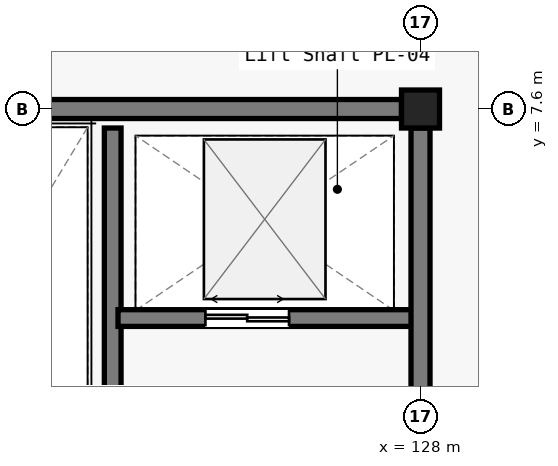
"""IFC4 building model, lengths in metres.
Left out: names, types, materials, properties, quantities, classifications, styles, units other than length and angle.
Written with IfcOpenShell. Run it as: python <this file> out.ifc"""

import sys

from ifc_helpers import new_model, si_unit, direction, frame, frame_2d, origin, origin_2d, place, context, subcontext, project, spatial, rectangle, extrude, element, fill, save


model = new_model("IFC4")
c1 = context("Model", 3, precision=1e-05, world=origin(), true_north=direction((0.0, 1.0)))
c2 = subcontext(c1, "Body", "Model", "MODEL_VIEW")
j1 = project(units=[si_unit("LENGTHUNIT", "METRE"), si_unit("PLANEANGLEUNIT", "RADIAN")], contexts=[c1])
p1 = place(None, origin())
s1 = spatial("IfcSite", under=j1, at=p1, CompositionType="ELEMENT")
p2 = place(p1, origin())
s2 = spatial("IfcBuilding", under=s1, at=p2, CompositionType="ELEMENT")
p3 = place(p2, frame((0.0, 0.0, 15.0)))
s3 = spatial("IfcBuildingStorey", under=s2, at=p3, CompositionType="ELEMENT", Elevation=15.0)
p4 = place(p3, frame((128.0, 7.6, 0.0), z_axis=(0.0, 0.0, 1.0), x_axis=(1.0, 0.0, 0.0)))
e1 = element("IfcColumn", 1, at=p4, inside=s3, PredefinedType="COLUMN", context=c2, shape_type="SweptSolid", body=[
    extrude(rectangle(XDim=0.5, YDim=0.5, at=origin_2d()), origin(), (0.0, 0.0, 1.0), 4.8),
])
p5 = place(p3, frame((120.3, 7.6, 0.0), z_axis=(0.0, 0.0, 1.0), x_axis=(1.0, 0.0, 0.0)))
e2 = element("IfcWall", 2, at=p5, inside=s3, PredefinedType="SOLIDWALL", context=c2, shape_type="SweptSolid", body=[
    extrude(rectangle(XDim=7.45, YDim=0.25, at=frame_2d((3.725, 0.0))), origin(), (0.0, 0.0, 1.0), 3.9),
])
p6 = place(p3, frame((123.95, 0.25, 0.0), z_axis=(0.0, 0.0, 1.0), x_axis=(0.0, 1.0, 0.0)))
e3 = element("IfcWall", 3, at=p6, inside=s3, PredefinedType="SOLIDWALL", context=c2, shape_type="SweptSolid", body=[
    extrude(rectangle(XDim=7.1, YDim=0.22, at=frame_2d((3.55, 0.0))), origin(), (0.0, 0.0, 1.0), 4.53),
])
p7 = place(p6, frame((0.35, 0.0, 0.0)))
e4 = element("IfcOpeningElement", 4, at=p7, cuts=e3, PredefinedType="OPENING", context=c2, shape_type="SweptSolid", body=[
    extrude(rectangle(XDim=1.2, YDim=2.15, at=frame_2d((0.6, 1.075))), frame((0.0, 0.12, 0.0), z_axis=(0.0, -1.0, 0.0), x_axis=(1.0, 0.0, 0.0)), (0.0, 0.0, 1.0), 0.24),
])
p8 = place(p3, frame((124.02, 4.85, 0.0), z_axis=(0.0, 0.0, 1.0), x_axis=(1.0, 0.0, 0.0)))
e5 = element("IfcWall", 5, at=p8, inside=s3, PredefinedType="SOLIDWALL", context=c2, shape_type="SweptSolid", body=[
    extrude(rectangle(XDim=3.93, YDim=0.22, at=frame_2d((1.965, 0.0))), origin(), (0.0, 0.0, 1.0), 3.9),
])
p9 = place(p8, frame((1.15, 0.0, 0.0)))
e6 = element("IfcOpeningElement", 6, at=p9, cuts=e5, PredefinedType="OPENING", context=c2, shape_type="SweptSolid", body=[
    extrude(rectangle(XDim=1.1, YDim=2.2, at=frame_2d((0.55, 1.1))), frame((0.0, 0.12, 0.0), z_axis=(0.0, -1.0, 0.0), x_axis=(1.0, 0.0, 0.0)), (0.0, 0.0, 1.0), 0.24),
])
p10 = place(p3, frame((128.0, 0.3, 0.0), z_axis=(0.0, 0.0, 1.0), x_axis=(0.0, 1.0, 0.0)))
e7 = element("IfcWall", 7, at=p10, inside=s3, PredefinedType="SOLIDWALL", context=c2, shape_type="SweptSolid", body=[
    extrude(rectangle(XDim=7.05, YDim=0.25, at=frame_2d((3.525, 0.0))), origin(), (0.0, 0.0, 1.0), 3.9),
])
p11 = place(p10, frame((2.05, 0.0, 0.0)))
e8 = element("IfcOpeningElement", 8, at=p11, cuts=e7, PredefinedType="OPENING", context=c2, shape_type="SweptSolid", body=[
    extrude(rectangle(XDim=1.35, YDim=2.2, at=frame_2d((0.675, 1.1))), frame((0.0, 0.135, 0.0), z_axis=(0.0, -1.0, 0.0), x_axis=(1.0, 0.0, 0.0)), (0.0, 0.0, 1.0), 0.27),
])
p12 = place(p9, origin())
e9 = element("IfcDoor", 9, at=p12, inside=s3, OperationType="DOUBLE_DOOR_SLIDING", PredefinedType="DOOR", context=c2, shape_type="SweptSolid", body=[
    extrude(rectangle(XDim=1.1, YDim=2.2, at=frame_2d((0.55, 1.1))), frame((0.0, 0.025, 0.0), z_axis=(0.0, -1.0, 0.0), x_axis=(1.0, 0.0, 0.0)), (0.0, 0.0, 1.0), 0.05),
])
fill(e6, e9)
save(model, sys.argv[1])
